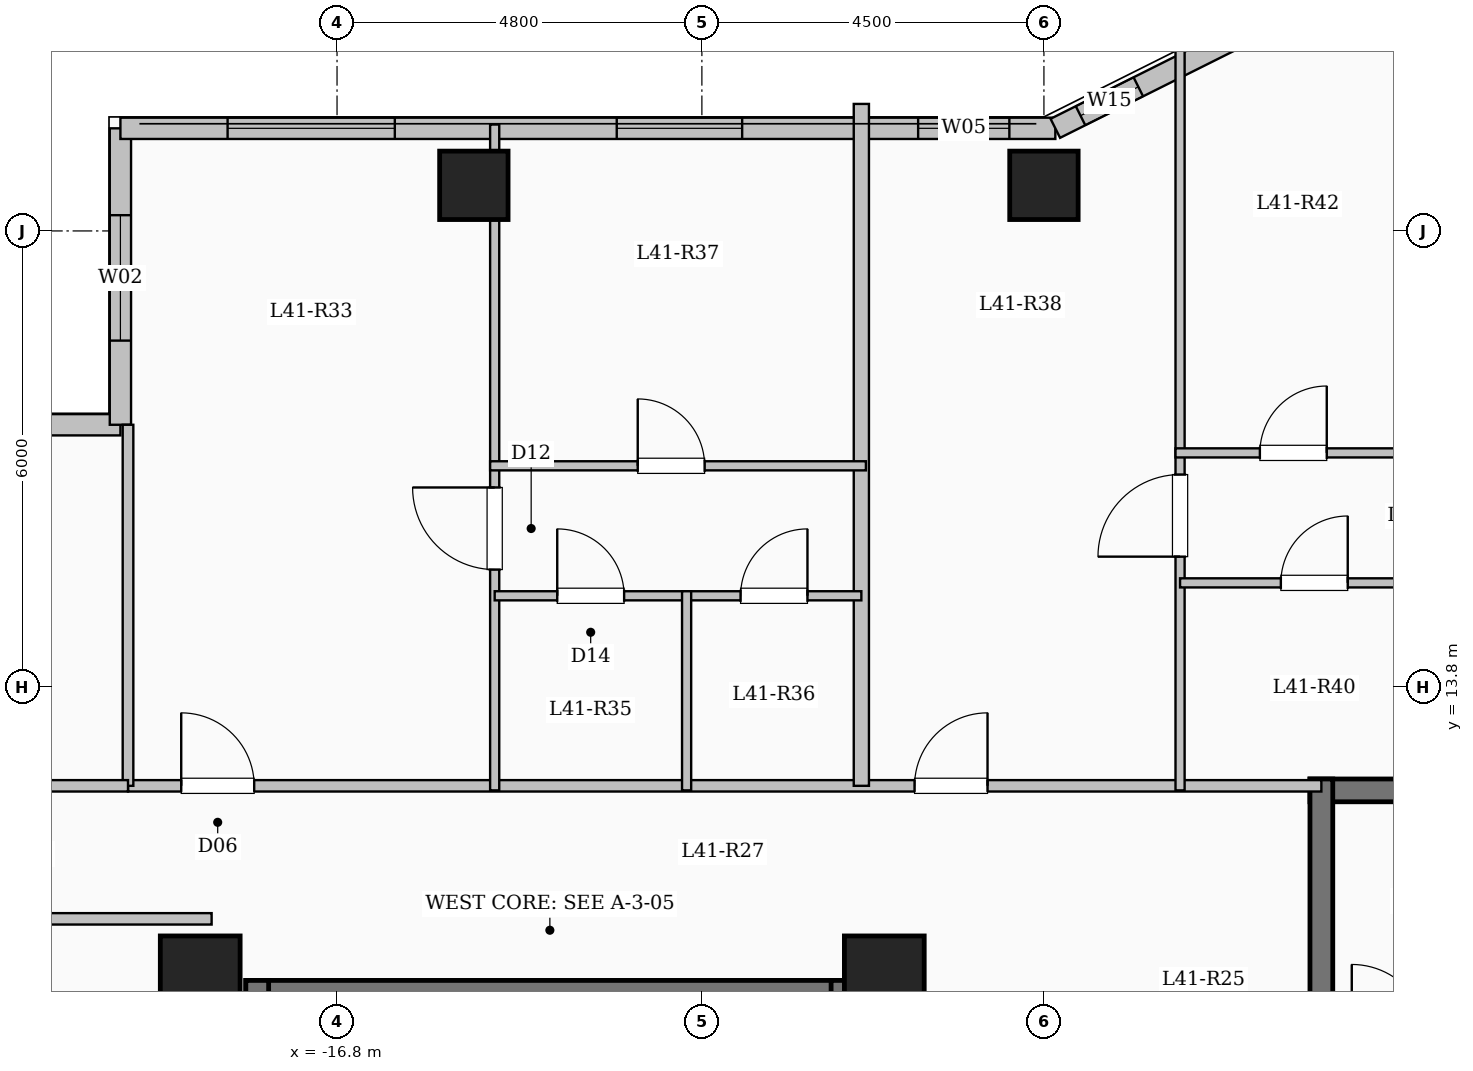
"""IFC4 building model, lengths in metres.
Left out: names, types, materials, properties, quantities, classifications, styles, units other than length and angle.
Written with IfcOpenShell. Run it as: python <this file> out.ifc"""

import sys

from ifc_helpers import new_model, si_unit, direction, frame, frame_2d, origin, origin_2d, place, context, subcontext, project, spatial, rectangle, extrude, element, fill, save


model = new_model("IFC4")
c1 = context("Model", 3, precision=1e-05, world=origin(), true_north=direction((0.0, 1.0)))
c2 = subcontext(c1, "Body", "Model", "MODEL_VIEW")
j1 = project(units=[si_unit("LENGTHUNIT", "METRE"), si_unit("PLANEANGLEUNIT", "RADIAN")], contexts=[c1])
p1 = place(None, origin())
s1 = spatial("IfcSite", under=j1, at=p1, CompositionType="ELEMENT")
p2 = place(p1, origin())
s2 = spatial("IfcBuilding", under=s1, at=p2, CompositionType="ELEMENT")
p3 = place(p2, frame((0.0, 0.0, 152.7)))
s3 = spatial("IfcBuildingStorey", under=s2, at=p3, CompositionType="ELEMENT", Elevation=152.7)
for number, where, z_axis, x_axis in (
    (1, (-9.6, 10.0, 0.0), (0.0, 0.0, 1.0), (1.0, 0.0, 0.0)),
    (2, (-18.6, 10.0, 0.0), (0.0, 0.0, 1.0), (1.0, 0.0, 0.0)),
):
    element("IfcColumn", number, at=place(p3, frame(where, z_axis=z_axis, x_axis=x_axis)), inside=s3, PredefinedType="COLUMN", context=c2, shape_type="SweptSolid", body=[
        extrude(rectangle(XDim=1.05, YDim=1.05, at=origin_2d()), origin(), (0.0, 0.0, 1.0), 3.35),
    ])
for number, where, z_axis, x_axis in (
    (3, (-15.0, 20.4, 0.0), (0.0, 0.0, 1.0), (1.0, 0.0, 0.0)),
    (4, (-7.5, 20.4, 0.0), (0.0, 0.0, 1.0), (1.0, 0.0, 0.0)),
):
    element("IfcColumn", number, at=place(p3, frame(where, z_axis=z_axis, x_axis=x_axis)), inside=s3, PredefinedType="COLUMN", context=c2, shape_type="SweptSolid", body=[
        extrude(rectangle(XDim=0.9, YDim=0.9, at=origin_2d()), origin(), (0.0, 0.0, 1.0), 3.35),
    ])
p4 = place(p3, frame((-25.05, 17.25, 0.0), z_axis=(0.0, 0.0, 1.0), x_axis=(1.0, 0.0, 0.0)))
e5 = element("IfcWall", 5, at=p4, inside=s3, PredefinedType="SOLIDWALL", context=c2, shape_type="SweptSolid", body=[
    extrude(rectangle(XDim=5.4, YDim=0.28, at=frame_2d((2.7, 0.0))), origin(), (0.0, 0.0, 1.0), 3.1),
])
p5 = place(p4, frame((1.725, 0.0, 0.9)))
e6 = element("IfcOpeningElement", 6, at=p5, cuts=e5, PredefinedType="OPENING", context=c2, shape_type="SweptSolid", body=[
    extrude(rectangle(XDim=2.0, YDim=1.7, at=frame_2d((1.0, 0.85))), frame((0.0, 0.15, 0.0), z_axis=(0.0, -1.0, 0.0), x_axis=(1.0, 0.0, 0.0)), (0.0, 0.0, 1.0), 0.3),
])
p6 = place(p3, frame((-19.65, 17.25, 0.0), z_axis=(0.0, 0.0, 1.0), x_axis=(0.0, 1.0, 0.0)))
e7 = element("IfcWall", 7, at=p6, inside=s3, PredefinedType="SOLIDWALL", context=c2, shape_type="SweptSolid", body=[
    extrude(rectangle(XDim=3.9, YDim=0.28, at=frame_2d((1.95, 0.0))), origin(), (0.0, 0.0, 1.0), 3.1),
])
p7 = place(p6, frame((1.107, 0.0, 0.9)))
e8 = element("IfcOpeningElement", 8, at=p7, cuts=e7, PredefinedType="OPENING", context=c2, shape_type="SweptSolid", body=[
    extrude(rectangle(XDim=1.65, YDim=1.6, at=frame_2d((0.825, 0.8))), frame((0.0, 0.15, 0.0), z_axis=(0.0, -1.0, 0.0), x_axis=(1.0, 0.0, 0.0)), (0.0, 0.0, 1.0), 0.3),
])
p8 = place(p3, frame((-19.65, 21.15, 0.0), z_axis=(0.0, 0.0, 1.0), x_axis=(1.0, 0.0, 0.0)))
e9 = element("IfcWall", 9, at=p8, inside=s3, PredefinedType="SOLIDWALL", context=c2, shape_type="SweptSolid", body=[
    extrude(rectangle(XDim=12.3, YDim=0.28, at=frame_2d((6.15, 0.0))), origin(), (0.0, 0.0, 1.0), 3.1),
])
p9 = place(p8, frame((1.41, 0.0, 0.9)))
e10 = element("IfcOpeningElement", 10, at=p9, cuts=e9, PredefinedType="OPENING", context=c2, shape_type="SweptSolid", body=[
    extrude(rectangle(XDim=2.2, YDim=1.75, at=frame_2d((1.1, 0.875))), frame((0.0, 0.15, 0.0), z_axis=(0.0, -1.0, 0.0), x_axis=(1.0, 0.0, 0.0)), (0.0, 0.0, 1.0), 0.3),
])
p10 = place(p8, frame((6.53, 0.0, 0.9)))
e11 = element("IfcOpeningElement", 11, at=p10, cuts=e9, PredefinedType="OPENING", context=c2, shape_type="SweptSolid", body=[
    extrude(rectangle(XDim=1.65, YDim=1.6, at=frame_2d((0.825, 0.8))), frame((0.0, 0.15, 0.0), z_axis=(0.0, -1.0, 0.0), x_axis=(1.0, 0.0, 0.0)), (0.0, 0.0, 1.0), 0.3),
])
p11 = place(p8, frame((10.495, 0.0, 0.95)))
e12 = element("IfcOpeningElement", 12, at=p11, cuts=e9, PredefinedType="OPENING", context=c2, shape_type="SweptSolid", body=[
    extrude(rectangle(XDim=1.2, YDim=1.5, at=frame_2d((0.6, 0.75))), frame((0.0, 0.15, 0.0), z_axis=(0.0, -1.0, 0.0), x_axis=(1.0, 0.0, 0.0)), (0.0, 0.0, 1.0), 0.3),
])
p12 = place(p3, frame((-7.35, 21.15, 0.0), z_axis=(0.0, 0.0, 1.0), x_axis=(0.894427191, 0.4472135955, 0.0)))
e13 = element("IfcWall", 13, at=p12, inside=s3, PredefinedType="SOLIDWALL", context=c2, shape_type="SweptSolid", body=[
    extrude(rectangle(XDim=3.354, YDim=0.28, at=frame_2d((1.677, 0.0))), origin(), (0.0, 0.0, 1.0), 3.1),
])
p13 = place(p12, frame((0.371, 0.0, 0.95)))
e14 = element("IfcOpeningElement", 14, at=p13, cuts=e13, PredefinedType="OPENING", context=c2, shape_type="SweptSolid", body=[
    extrude(rectangle(XDim=0.85, YDim=1.5, at=frame_2d((0.425, 0.75))), frame((0.0, 0.15, 0.0), z_axis=(0.0, -1.0, 0.0), x_axis=(1.0, 0.0, 0.0)), (0.0, 0.0, 1.0), 0.3),
])
p14 = place(p3, frame((-18.0, 9.79, 0.0), z_axis=(0.0, 0.0, 1.0), x_axis=(1.0, 0.0, 0.0)))
e15 = element("IfcWall", 15, at=p14, inside=s3, PredefinedType="SHEAR", context=c2, shape_type="SweptSolid", body=[
    extrude(rectangle(XDim=8.0, YDim=0.3, at=frame_2d((4.0, 0.0))), origin(), (0.0, 0.0, 1.0), 3.35),
])
for number, where, z_axis, x_axis in (
    (16, (-17.85, 6.35, 0.0), (0.0, 0.0, 1.0), (0.0, 1.0, 0.0)),
    (17, (-10.15, 6.35, 0.0), (0.0, 0.0, 1.0), (0.0, 1.0, 0.0)),
):
    element("IfcWall", number, at=place(p3, frame(where, z_axis=z_axis, x_axis=x_axis)), inside=s3, PredefinedType="SHEAR", context=c2, shape_type="SweptSolid", body=[
        extrude(rectangle(XDim=3.59, YDim=0.3, at=frame_2d((1.795, 0.0))), origin(), (0.0, 0.0, 1.0), 3.35),
    ])
p15 = place(p3, frame((-4.0, 12.44, 0.0), z_axis=(0.0, 0.0, 1.0), x_axis=(1.0, 0.0, 0.0)))
e18 = element("IfcWall", 18, at=p15, inside=s3, PredefinedType="SHEAR", context=c2, shape_type="SweptSolid", body=[
    extrude(rectangle(XDim=8.0, YDim=0.3, at=frame_2d((4.0, 0.0))), origin(), (0.0, 0.0, 1.0), 3.35),
])
p16 = place(p3, frame((-3.85, 9.0, 0.0), z_axis=(0.0, 0.0, 1.0), x_axis=(0.0, 1.0, 0.0)))
e19 = element("IfcWall", 19, at=p16, inside=s3, PredefinedType="SHEAR", context=c2, shape_type="SweptSolid", body=[
    extrude(rectangle(XDim=3.59, YDim=0.3, at=frame_2d((1.795, 0.0))), origin(), (0.0, 0.0, 1.0), 3.35),
])
p17 = place(p3, frame((-19.55, 12.5, 0.0), z_axis=(0.0, 0.0, 1.0), x_axis=(1.0, 0.0, 0.0)))
e20 = element("IfcWall", 20, at=p17, inside=s3, PredefinedType="PARTITIONING", context=c2, shape_type="SweptSolid", body=[
    extrude(rectangle(XDim=15.7, YDim=0.15, at=frame_2d((7.85, 0.0))), origin(), (0.0, 0.0, 1.0), 3.1),
])
p18 = place(p17, frame((0.7, 0.0, 0.0)))
e21 = element("IfcOpeningElement", 21, at=p18, cuts=e20, PredefinedType="OPENING", context=c2, shape_type="SweptSolid", body=[
    extrude(rectangle(XDim=0.96, YDim=2.15, at=frame_2d((0.48, 1.075))), frame((0.0, 0.085, 0.0), z_axis=(0.0, -1.0, 0.0), x_axis=(1.0, 0.0, 0.0)), (0.0, 0.0, 1.0), 0.17),
])
p19 = place(p17, frame((10.348, 0.0, 0.0)))
e22 = element("IfcOpeningElement", 22, at=p19, cuts=e20, PredefinedType="OPENING", context=c2, shape_type="SweptSolid", body=[
    extrude(rectangle(XDim=0.96, YDim=2.15, at=frame_2d((0.48, 1.075))), frame((0.0, 0.085, 0.0), z_axis=(0.0, -1.0, 0.0), x_axis=(1.0, 0.0, 0.0)), (0.0, 0.0, 1.0), 0.17),
])
p20 = place(p3, frame((-9.902, 12.5, 0.0), z_axis=(0.0, 0.0, 1.0), x_axis=(0.0, 1.0, 0.0)))
e23 = element("IfcWall", 23, at=p20, inside=s3, PredefinedType="SOLIDWALL", context=c2, shape_type="SweptSolid", body=[
    extrude(rectangle(XDim=8.971, YDim=0.2, at=frame_2d((4.485, 0.0))), origin(), (0.0, 0.0, 1.0), 3.1),
])
p21 = place(p3, frame((-14.726, 12.44, 0.0), z_axis=(0.0, 0.0, 1.0), x_axis=(0.0, 1.0, 0.0)))
e24 = element("IfcWall", 24, at=p21, inside=s3, PredefinedType="PARTITIONING", context=c2, shape_type="SweptSolid", body=[
    extrude(rectangle(XDim=8.76, YDim=0.12, at=frame_2d((4.38, 0.0))), origin(), (0.0, 0.0, 1.0), 2.585),
])
p22 = place(p21, frame((2.905, 0.0, 0.0)))
e25 = element("IfcOpeningElement", 25, at=p22, cuts=e24, PredefinedType="OPENING", context=c2, shape_type="SweptSolid", body=[
    extrude(rectangle(XDim=1.08, YDim=2.15, at=frame_2d((0.54, 1.075))), frame((0.0, 0.07, 0.0), z_axis=(0.0, -1.0, 0.0), x_axis=(1.0, 0.0, 0.0)), (0.0, 0.0, 1.0), 0.14),
])
p23 = place(p3, frame((-14.726, 15.0, 0.0), z_axis=(0.0, 0.0, 1.0), x_axis=(1.0, 0.0, 0.0)))
e26 = element("IfcWall", 26, at=p23, inside=s3, PredefinedType="PARTITIONING", context=c2, shape_type="SweptSolid", body=[
    extrude(rectangle(XDim=2.525, YDim=0.12, at=frame_2d((1.263, 0.0))), origin(), (0.0, 0.0, 1.0), 3.1),
])
p24 = place(p23, frame((0.823, 0.0, 0.0)))
e27 = element("IfcOpeningElement", 27, at=p24, cuts=e26, PredefinedType="OPENING", context=c2, shape_type="SweptSolid", body=[
    extrude(rectangle(XDim=0.88, YDim=2.1, at=frame_2d((0.44, 1.05))), frame((0.0, 0.07, 0.0), z_axis=(0.0, -1.0, 0.0), x_axis=(1.0, 0.0, 0.0)), (0.0, 0.0, 1.0), 0.14),
])
p25 = place(p3, frame((-12.201, 15.0, 0.0), z_axis=(0.0, 0.0, 1.0), x_axis=(1.0, 0.0, 0.0)))
e28 = element("IfcWall", 28, at=p25, inside=s3, PredefinedType="PARTITIONING", context=c2, shape_type="SweptSolid", body=[
    extrude(rectangle(XDim=2.299, YDim=0.12, at=frame_2d((1.149, 0.0))), origin(), (0.0, 0.0, 1.0), 3.1),
])
p26 = place(p25, frame((0.71, 0.0, 0.0)))
e29 = element("IfcOpeningElement", 29, at=p26, cuts=e28, PredefinedType="OPENING", context=c2, shape_type="SweptSolid", body=[
    extrude(rectangle(XDim=0.88, YDim=2.1, at=frame_2d((0.44, 1.05))), frame((0.0, 0.07, 0.0), z_axis=(0.0, -1.0, 0.0), x_axis=(1.0, 0.0, 0.0)), (0.0, 0.0, 1.0), 0.14),
])
p27 = place(p3, frame((-14.786, 16.71, 0.0), z_axis=(0.0, 0.0, 1.0), x_axis=(1.0, 0.0, 0.0)))
e30 = element("IfcWall", 30, at=p27, inside=s3, PredefinedType="PARTITIONING", context=c2, shape_type="SweptSolid", body=[
    extrude(rectangle(XDim=4.944, YDim=0.12, at=frame_2d((2.472, 0.0))), origin(), (0.0, 0.0, 1.0), 3.1),
])
p28 = place(p27, frame((1.942, 0.0, 0.0)))
e31 = element("IfcOpeningElement", 31, at=p28, cuts=e30, PredefinedType="OPENING", context=c2, shape_type="SweptSolid", body=[
    extrude(rectangle(XDim=0.88, YDim=2.1, at=frame_2d((0.44, 1.05))), frame((0.0, 0.07, 0.0), z_axis=(0.0, -1.0, 0.0), x_axis=(1.0, 0.0, 0.0)), (0.0, 0.0, 1.0), 0.14),
])
p29 = place(p3, frame((-12.201, 12.44, 0.0), z_axis=(0.0, 0.0, 1.0), x_axis=(0.0, 1.0, 0.0)))
e32 = element("IfcWall", 32, at=p29, inside=s3, PredefinedType="PARTITIONING", context=c2, shape_type="SweptSolid", body=[
    extrude(rectangle(XDim=2.62, YDim=0.12, at=frame_2d((1.31, 0.0))), origin(), (0.0, 0.0, 1.0), 3.1),
])
p30 = place(p3, frame((-5.709, 12.44, 0.0), z_axis=(0.0, 0.0, 1.0), x_axis=(0.0, 1.0, 0.0)))
e33 = element("IfcWall", 33, at=p30, inside=s3, PredefinedType="PARTITIONING", context=c2, shape_type="SweptSolid", body=[
    extrude(rectangle(XDim=10.065, YDim=0.12, at=frame_2d((5.032, 0.0))), origin(), (0.0, 0.0, 1.0), 3.1),
])
p31 = place(p30, frame((3.075, 0.0, 0.0)))
e34 = element("IfcOpeningElement", 34, at=p31, cuts=e33, PredefinedType="OPENING", context=c2, shape_type="SweptSolid", body=[
    extrude(rectangle(XDim=1.08, YDim=2.15, at=frame_2d((0.54, 1.075))), frame((0.0, 0.07, 0.0), z_axis=(0.0, -1.0, 0.0), x_axis=(1.0, 0.0, 0.0)), (0.0, 0.0, 1.0), 0.14),
])
p32 = place(p3, frame((-5.709, 15.17, 0.0), z_axis=(0.0, 0.0, 1.0), x_axis=(1.0, 0.0, 0.0)))
e35 = element("IfcWall", 35, at=p32, inside=s3, PredefinedType="PARTITIONING", context=c2, shape_type="SweptSolid", body=[
    extrude(rectangle(XDim=3.533, YDim=0.12, at=frame_2d((1.767, 0.0))), origin(), (0.0, 0.0, 1.0), 3.1),
])
p33 = place(p32, frame((1.326, 0.0, 0.0)))
e36 = element("IfcOpeningElement", 36, at=p33, cuts=e35, PredefinedType="OPENING", context=c2, shape_type="SweptSolid", body=[
    extrude(rectangle(XDim=0.88, YDim=2.1, at=frame_2d((0.44, 1.05))), frame((0.0, 0.07, 0.0), z_axis=(0.0, -1.0, 0.0), x_axis=(1.0, 0.0, 0.0)), (0.0, 0.0, 1.0), 0.14),
])
p34 = place(p3, frame((-5.769, 16.88, 0.0), z_axis=(0.0, 0.0, 1.0), x_axis=(1.0, 0.0, 0.0)))
e37 = element("IfcWall", 37, at=p34, inside=s3, PredefinedType="PARTITIONING", context=c2, shape_type="SweptSolid", body=[
    extrude(rectangle(XDim=6.379, YDim=0.12, at=frame_2d((3.189, 0.0))), origin(), (0.0, 0.0, 1.0), 2.685),
])
p35 = place(p34, frame((1.11, 0.0, 0.0)))
e38 = element("IfcOpeningElement", 38, at=p35, cuts=e37, PredefinedType="OPENING", context=c2, shape_type="SweptSolid", body=[
    extrude(rectangle(XDim=0.88, YDim=2.1, at=frame_2d((0.44, 1.05))), frame((0.0, 0.07, 0.0), z_axis=(0.0, -1.0, 0.0), x_axis=(1.0, 0.0, 0.0)), (0.0, 0.0, 1.0), 0.14),
])
p36 = place(p34, frame((4.209, 0.0, 0.0)))
e39 = element("IfcOpeningElement", 39, at=p36, cuts=e37, PredefinedType="OPENING", context=c2, shape_type="SweptSolid", body=[
    extrude(rectangle(XDim=0.88, YDim=2.1, at=frame_2d((0.44, 1.05))), frame((0.0, 0.07, 0.0), z_axis=(0.0, -1.0, 0.0), x_axis=(1.0, 0.0, 0.0)), (0.0, 0.0, 1.0), 0.14),
])
p37 = place(p3, frame((-25.08, 10.75, 0.0), z_axis=(0.0, 0.0, 1.0), x_axis=(1.0, 0.0, 0.0)))
e40 = element("IfcWall", 40, at=p37, inside=s3, PredefinedType="PARTITIONING", context=c2, shape_type="SweptSolid", body=[
    extrude(rectangle(XDim=6.63, YDim=0.15, at=frame_2d((3.315, 0.0))), origin(), (0.0, 0.0, 1.0), 3.1),
])
p38 = place(p3, frame((-19.55, 12.5, 0.0), z_axis=(0.0, 0.0, 1.0), x_axis=(0.0, 1.0, 0.0)))
e41 = element("IfcWall", 41, at=p38, inside=s3, PredefinedType="PARTITIONING", context=c2, shape_type="SweptSolid", body=[
    extrude(rectangle(XDim=4.75, YDim=0.14, at=frame_2d((2.375, 0.0))), origin(), (0.0, 0.0, 1.0), 3.1),
])
p39 = place(p3, frame((-25.08, 12.5, 0.0), z_axis=(0.0, 0.0, 1.0), x_axis=(1.0, 0.0, 0.0)))
e42 = element("IfcWall", 42, at=p39, inside=s3, PredefinedType="PARTITIONING", context=c2, shape_type="SweptSolid", body=[
    extrude(rectangle(XDim=5.53, YDim=0.15, at=frame_2d((2.765, 0.0))), origin(), (0.0, 0.0, 1.0), 3.1),
])
p40 = place(p39, frame((2.29, 0.0, 0.0)))
e43 = element("IfcOpeningElement", 43, at=p40, cuts=e42, PredefinedType="OPENING", context=c2, shape_type="SweptSolid", body=[
    extrude(rectangle(XDim=0.95, YDim=2.15, at=frame_2d((0.475, 1.075))), frame((0.0, 0.085, 0.0), z_axis=(0.0, -1.0, 0.0), x_axis=(1.0, 0.0, 0.0)), (0.0, 0.0, 1.0), 0.17),
])
p41 = place(p7, origin())
e44 = element("IfcWindow", 44, at=p41, inside=s3, PartitioningType="SINGLE_PANEL", PredefinedType="WINDOW", context=c2, shape_type="SweptSolid", body=[
    extrude(rectangle(XDim=1.65, YDim=1.6, at=frame_2d((0.825, 0.8))), frame((0.0, 0.03, 0.0), z_axis=(0.0, -1.0, 0.0), x_axis=(1.0, 0.0, 0.0)), (0.0, 0.0, 1.0), 0.06),
])
fill(e8, e44)
p42 = place(p9, origin())
e45 = element("IfcWindow", 45, at=p42, inside=s3, PartitioningType="SINGLE_PANEL", PredefinedType="WINDOW", context=c2, shape_type="SweptSolid", body=[
    extrude(rectangle(XDim=2.2, YDim=1.75, at=frame_2d((1.1, 0.875))), frame((0.0, 0.03, 0.0), z_axis=(0.0, -1.0, 0.0), x_axis=(1.0, 0.0, 0.0)), (0.0, 0.0, 1.0), 0.06),
])
fill(e10, e45)
p43 = place(p10, origin())
e46 = element("IfcWindow", 46, at=p43, inside=s3, PartitioningType="SINGLE_PANEL", PredefinedType="WINDOW", context=c2, shape_type="SweptSolid", body=[
    extrude(rectangle(XDim=1.65, YDim=1.6, at=frame_2d((0.825, 0.8))), frame((0.0, 0.03, 0.0), z_axis=(0.0, -1.0, 0.0), x_axis=(1.0, 0.0, 0.0)), (0.0, 0.0, 1.0), 0.06),
])
fill(e11, e46)
p44 = place(p11, origin())
e47 = element("IfcWindow", 47, at=p44, inside=s3, PartitioningType="SINGLE_PANEL", PredefinedType="WINDOW", context=c2, shape_type="SweptSolid", body=[
    extrude(rectangle(XDim=1.2, YDim=1.5, at=frame_2d((0.6, 0.75))), frame((0.0, 0.03, 0.0), z_axis=(0.0, -1.0, 0.0), x_axis=(1.0, 0.0, 0.0)), (0.0, 0.0, 1.0), 0.06),
])
fill(e12, e47)
p45 = place(p13, origin())
e48 = element("IfcWindow", 48, at=p45, inside=s3, PartitioningType="SINGLE_PANEL", PredefinedType="WINDOW", context=c2, shape_type="SweptSolid", body=[
    extrude(rectangle(XDim=0.85, YDim=1.5, at=frame_2d((0.425, 0.75))), frame((0.0, 0.03, 0.0), z_axis=(0.0, -1.0, 0.0), x_axis=(1.0, 0.0, 0.0)), (0.0, 0.0, 1.0), 0.06),
])
fill(e14, e48)
p46 = place(p18, origin())
e49 = element("IfcDoor", 49, at=p46, inside=s3, OperationType="SINGLE_SWING_LEFT", PredefinedType="DOOR", context=c2, shape_type="SweptSolid", body=[
    extrude(rectangle(XDim=0.96, YDim=2.15, at=frame_2d((0.48, 1.075))), frame((0.0, 0.025, 0.0), z_axis=(0.0, -1.0, 0.0), x_axis=(1.0, 0.0, 0.0)), (0.0, 0.0, 1.0), 0.05),
])
fill(e21, e49)
p47 = place(p22, origin())
e50 = element("IfcDoor", 50, at=p47, inside=s3, OperationType="SINGLE_SWING_RIGHT", PredefinedType="DOOR", context=c2, shape_type="SweptSolid", body=[
    extrude(rectangle(XDim=1.08, YDim=2.15, at=frame_2d((0.54, 1.075))), frame((0.0, 0.025, 0.0), z_axis=(0.0, -1.0, 0.0), x_axis=(1.0, 0.0, 0.0)), (0.0, 0.0, 1.0), 0.05),
])
fill(e25, e50)
p48 = place(p24, origin())
e51 = element("IfcDoor", 51, at=p48, inside=s3, OperationType="SINGLE_SWING_LEFT", PredefinedType="DOOR", context=c2, shape_type="SweptSolid", body=[
    extrude(rectangle(XDim=0.88, YDim=2.1, at=frame_2d((0.44, 1.05))), frame((0.0, 0.025, 0.0), z_axis=(0.0, -1.0, 0.0), x_axis=(1.0, 0.0, 0.0)), (0.0, 0.0, 1.0), 0.05),
])
fill(e27, e51)
p49 = place(p26, origin())
e52 = element("IfcDoor", 52, at=p49, inside=s3, OperationType="SINGLE_SWING_RIGHT", PredefinedType="DOOR", context=c2, shape_type="SweptSolid", body=[
    extrude(rectangle(XDim=0.88, YDim=2.1, at=frame_2d((0.44, 1.05))), frame((0.0, 0.025, 0.0), z_axis=(0.0, -1.0, 0.0), x_axis=(1.0, 0.0, 0.0)), (0.0, 0.0, 1.0), 0.05),
])
fill(e29, e52)
p50 = place(p28, origin())
e53 = element("IfcDoor", 53, at=p50, inside=s3, OperationType="SINGLE_SWING_LEFT", PredefinedType="DOOR", context=c2, shape_type="SweptSolid", body=[
    extrude(rectangle(XDim=0.88, YDim=2.1, at=frame_2d((0.44, 1.05))), frame((0.0, 0.025, 0.0), z_axis=(0.0, -1.0, 0.0), x_axis=(1.0, 0.0, 0.0)), (0.0, 0.0, 1.0), 0.05),
])
fill(e31, e53)
p51 = place(p19, origin())
e54 = element("IfcDoor", 54, at=p51, inside=s3, OperationType="SINGLE_SWING_RIGHT", PredefinedType="DOOR", context=c2, shape_type="SweptSolid", body=[
    extrude(rectangle(XDim=0.96, YDim=2.15, at=frame_2d((0.48, 1.075))), frame((0.0, 0.025, 0.0), z_axis=(0.0, -1.0, 0.0), x_axis=(1.0, 0.0, 0.0)), (0.0, 0.0, 1.0), 0.05),
])
fill(e22, e54)
p52 = place(p31, origin())
e55 = element("IfcDoor", 55, at=p52, inside=s3, OperationType="SINGLE_SWING_LEFT", PredefinedType="DOOR", context=c2, shape_type="SweptSolid", body=[
    extrude(rectangle(XDim=1.08, YDim=2.15, at=frame_2d((0.54, 1.075))), frame((0.0, 0.025, 0.0), z_axis=(0.0, -1.0, 0.0), x_axis=(1.0, 0.0, 0.0)), (0.0, 0.0, 1.0), 0.05),
])
fill(e34, e55)
p53 = place(p33, origin())
e56 = element("IfcDoor", 56, at=p53, inside=s3, OperationType="SINGLE_SWING_RIGHT", PredefinedType="DOOR", context=c2, shape_type="SweptSolid", body=[
    extrude(rectangle(XDim=0.88, YDim=2.1, at=frame_2d((0.44, 1.05))), frame((0.0, 0.025, 0.0), z_axis=(0.0, -1.0, 0.0), x_axis=(1.0, 0.0, 0.0)), (0.0, 0.0, 1.0), 0.05),
])
fill(e36, e56)
p54 = place(p35, origin())
e57 = element("IfcDoor", 57, at=p54, inside=s3, OperationType="SINGLE_SWING_RIGHT", PredefinedType="DOOR", context=c2, shape_type="SweptSolid", body=[
    extrude(rectangle(XDim=0.88, YDim=2.1, at=frame_2d((0.44, 1.05))), frame((0.0, 0.025, 0.0), z_axis=(0.0, -1.0, 0.0), x_axis=(1.0, 0.0, 0.0)), (0.0, 0.0, 1.0), 0.05),
])
fill(e38, e57)
save(model, sys.argv[1])
